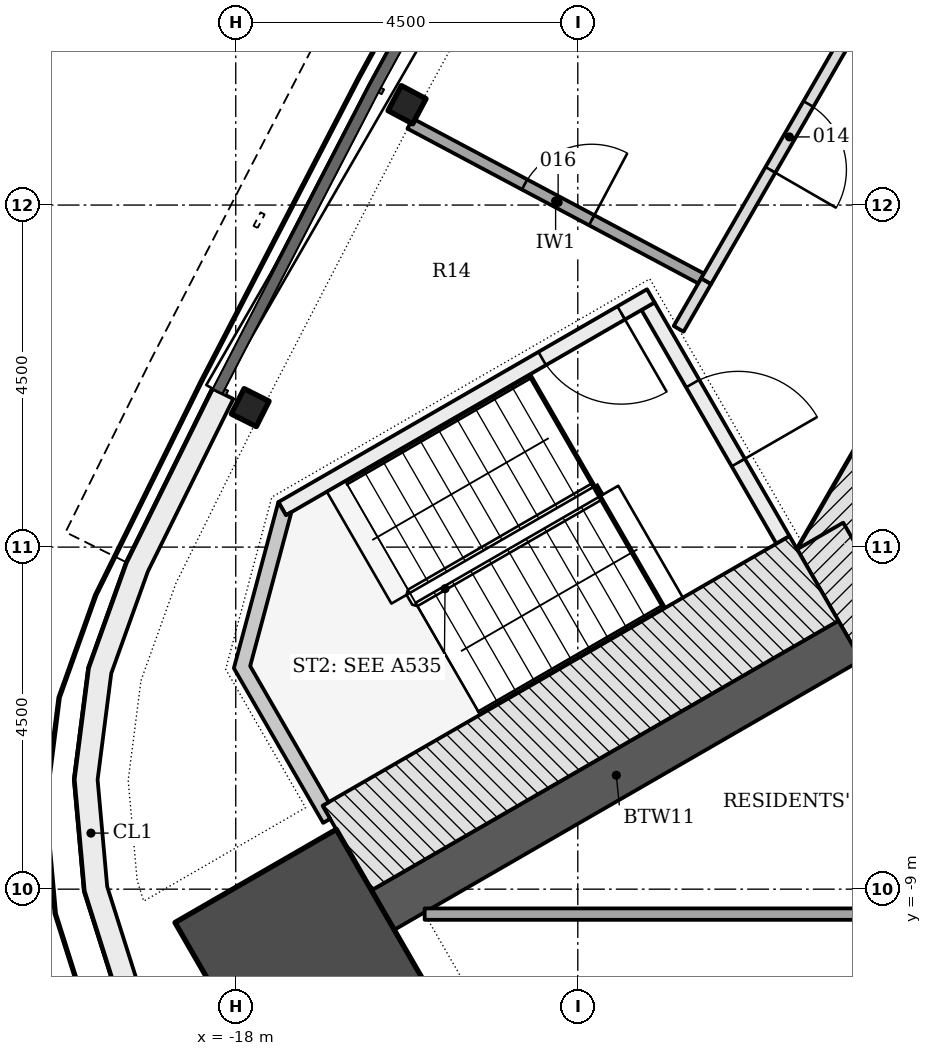
"""IFC4 building model, lengths in metres.
Left out: names, types, materials, properties, quantities, classifications, styles, units other than length and angle.
Written with IfcOpenShell. Run it as: python <this file> out.ifc"""

import sys

from ifc_helpers import new_model, si_unit, direction, frame, frame_2d, origin, origin_2d, place, context, subcontext, project, spatial, polyline, rectangle, i_section, outline, extrude, element, fill, save


model = new_model("IFC4")
c1 = context("Model", 3, precision=1e-05, world=origin(), true_north=direction((0.0, 1.0)))
c2 = subcontext(c1, "Body", "Model", "MODEL_VIEW")
j1 = project(units=[si_unit("LENGTHUNIT", "METRE"), si_unit("PLANEANGLEUNIT", "RADIAN")], contexts=[c1])
p1 = place(None, origin())
s1 = spatial("IfcSite", under=j1, at=p1, CompositionType="ELEMENT")
p2 = place(p1, origin())
s2 = spatial("IfcBuilding", under=s1, at=p2, CompositionType="ELEMENT")
p3 = place(p2, frame((0.0, 0.0, 240.0)))
s3 = spatial("IfcBuildingStorey", under=s2, at=p3, CompositionType="ELEMENT", Elevation=240.0)
p4 = place(p3, frame((-1.083, 11.281, -0.2), z_axis=(0.0, 0.0, 1.0), x_axis=(-0.500001446645, -0.866024568562, 0.0)))
e1 = element("IfcWall", 1, at=p4, inside=s3, PredefinedType="SHEAR", context=c2, shape_type="SweptSolid", body=[
    extrude(rectangle(XDim=18.458, YDim=0.7, at=frame_2d((9.229, 0.0))), origin(), (0.0, 0.0, 1.0), 3.6),
])
p5 = place(p4, frame((8.979, 0.0, 0.2)))
e2 = element("IfcOpeningElement", 2, at=p5, cuts=e1, PredefinedType="OPENING", context=c2, shape_type="SweptSolid", body=[
    extrude(rectangle(XDim=1.2, YDim=2.1, at=frame_2d((0.6, 1.05))), frame((0.0, 0.36, 0.0), z_axis=(0.0, -1.0, 0.0), x_axis=(1.0, 0.0, 0.0)), (0.0, 0.0, 1.0), 0.72),
])
p6 = place(p4, frame((11.029, 0.0, 0.2)))
e3 = element("IfcOpeningElement", 3, at=p6, cuts=e1, PredefinedType="OPENING", context=c2, shape_type="SweptSolid", body=[
    extrude(rectangle(XDim=1.2, YDim=2.1, at=frame_2d((0.6, 1.05))), frame((0.0, 0.36, 0.0), z_axis=(0.0, -1.0, 0.0), x_axis=(1.0, 0.0, 0.0)), (0.0, 0.0, 1.0), 0.72),
])
p7 = place(p3, frame((-10.311, -4.353, -0.2), z_axis=(0.0, 0.0, 1.0), x_axis=(0.500042739161, -0.866000726912, 0.0)))
e4 = element("IfcWall", 4, at=p7, inside=s3, PredefinedType="SHEAR", context=c2, shape_type="SweptSolid", body=[
    extrude(rectangle(XDim=2.771, YDim=0.7, at=frame_2d((1.386, 0.0))), origin(), (0.0, 0.0, 1.0), 3.6),
])
p8 = place(p3, frame((-9.922, -5.728, -0.2), z_axis=(0.0, 0.0, 1.0), x_axis=(-0.866029688112, -0.499992579254, 0.0)))
e5 = element("IfcWall", 5, at=p8, inside=s3, PredefinedType="SHEAR", context=c2, shape_type="SweptSolid", body=[
    extrude(rectangle(XDim=7.093, YDim=0.6, at=frame_2d((3.547, 0.0))), origin(), (0.0, 0.0, 1.0), 3.6),
])
p9 = place(p3, frame((-17.126, -9.887, -0.2), z_axis=(0.0, 0.0, 1.0), x_axis=(-0.866025403784, -0.5, 0.0)))
e6 = element("IfcColumn", 6, at=p9, inside=s3, PredefinedType="COLUMN", context=c2, shape_type="SweptSolid", body=[
    extrude(rectangle(XDim=2.45, YDim=2.45, at=origin_2d()), origin(), (0.0, 0.0, 1.0), 3.6),
])
for number, where, z_axis, x_axis in (
    (7, (-15.747, 1.32, -0.2), (0.0, 0.0, 1.0), (-0.47, -0.883, 0.0)),
    (8, (-17.81, -2.665, -0.2), (0.0, 0.0, 1.0), (-0.45, -0.893, 0.0)),
):
    element("IfcColumn", number, at=place(p3, frame(where, z_axis=z_axis, x_axis=x_axis)), inside=s3, PredefinedType="COLUMN", context=c2, shape_type="SweptSolid", body=[
        extrude(i_section(OverallWidth=0.373, OverallDepth=0.368, WebThickness=0.015, FlangeThickness=0.024, FilletRadius=0.015, at=origin_2d()), origin(), (0.0, 0.0, 1.0), 3.6),
    ])
p10 = place(p3, origin())
e9 = element("IfcWall", 9, at=p10, inside=s3, PredefinedType="NOTDEFINED", context=c2, shape_type="SweptSolid", body=[
    extrude(outline(polyline([(-18.301, -2.417), (-19.433, -4.702), (-19.931, -6.091), (-20.119, -7.555), (-19.987, -9.024), (-19.542, -10.431), (-18.804, -11.708), (-17.809, -12.798), (-16.602, -13.646), (-15.241, -14.215), (-13.789, -14.478), (-11.244, -14.641), (-11.225, -14.341), (-13.752, -14.18), (-15.155, -13.926), (-16.456, -13.382), (-17.609, -12.571), (-18.561, -11.53), (-19.266, -10.309), (-19.691, -8.965), (-19.817, -7.56), (-19.638, -6.162), (-19.156, -4.82), (-18.032, -2.55), (-18.301, -2.417)])), origin(), (0.0, 0.0, 1.0), 3.3),
])
p11 = place(p3, frame((-12.576, -1.331, -0.2), z_axis=(0.0, 0.0, 1.0), x_axis=(0.499970499736, -0.8660424351, 0.0)))
e10 = element("IfcWall", 10, at=p11, inside=s3, PredefinedType="SHEAR", context=c2, shape_type="SweptSolid", body=[
    extrude(rectangle(XDim=3.55, YDim=0.2, at=frame_2d((1.775, 0.0))), origin(), (0.0, 0.0, 1.0), 3.6),
])
p12 = place(p11, frame((1.175, 0.0, 0.2)))
e11 = element("IfcOpeningElement", 11, at=p12, cuts=e10, PredefinedType="OPENING", context=c2, shape_type="SweptSolid", body=[
    extrude(rectangle(XDim=1.2, YDim=2.1, at=frame_2d((0.6, 1.05))), frame((0.0, 0.11, 0.0), z_axis=(0.0, -1.0, 0.0), x_axis=(1.0, 0.0, 0.0)), (0.0, 0.0, 1.0), 0.22),
])
p13 = place(p3, frame((-12.539, -1.194, -0.2), z_axis=(0.0, 0.0, 1.0), x_axis=(-0.866045472092, -0.499965239061, 0.0)))
e12 = element("IfcWall", 12, at=p13, inside=s3, PredefinedType="SHEAR", context=c2, shape_type="SweptSolid", body=[
    extrude(rectangle(XDim=5.6, YDim=0.2, at=frame_2d((2.8, 0.0))), origin(), (0.0, 0.0, 1.0), 3.6),
])
p14 = place(p13, frame((0.45, 0.0, 0.2)))
e13 = element("IfcOpeningElement", 13, at=p14, cuts=e12, PredefinedType="OPENING", context=c2, shape_type="SweptSolid", body=[
    extrude(rectangle(XDim=1.2, YDim=2.1, at=frame_2d((0.6, 1.05))), frame((0.0, 0.11, 0.0), z_axis=(0.0, -1.0, 0.0), x_axis=(1.0, 0.0, 0.0)), (0.0, 0.0, 1.0), 0.22),
])
p15 = place(p3, frame((-10.393, -4.912, -0.2), z_axis=(0.0, 0.0, 1.0), x_axis=(-0.866023389271, -0.500003489223, 0.0)))
e14 = element("IfcWall", 14, at=p15, inside=s3, PredefinedType="SHEAR", context=c2, shape_type="SweptSolid", body=[
    extrude(rectangle(XDim=7.094, YDim=1.286, at=frame_2d((3.547, 0.0))), origin(), (0.0, 0.0, 1.0), 3.6),
])
p16 = place(p3, frame((0.0, 0.0, -0.2)))
e15 = element("IfcWall", 15, at=p16, inside=s3, PredefinedType="SHEAR", context=c2, shape_type="SweptSolid", body=[
    extrude(outline(polyline([(-17.439, -3.907), (-18.025, -6.093), (-16.85, -8.128), (-16.758, -8.075), (-16.858, -7.902), (-16.858, -7.902), (-16.858, -7.902), (-16.858, -7.902), (-16.858, -7.902), (-16.858, -7.902), (-16.858, -7.902), (-16.858, -7.902), (-16.858, -7.902), (-16.858, -7.902), (-16.858, -7.902), (-16.858, -7.902), (-16.858, -7.902), (-16.858, -7.902), (-16.858, -7.902), (-16.858, -7.902), (-16.858, -7.902), (-16.777, -7.855), (-17.81, -6.065), (-17.267, -4.039), (-17.339, -4.081), (-17.339, -4.081), (-17.339, -4.081), (-17.339, -4.081), (-17.339, -4.081), (-17.339, -4.081), (-17.339, -4.081), (-17.339, -4.081), (-17.339, -4.081), (-17.339, -4.081), (-17.339, -4.081), (-17.339, -4.081), (-17.339, -4.081), (-17.339, -4.081), (-17.339, -4.081), (-17.339, -4.081), (-17.339, -4.081), (-17.439, -3.907)])), origin(), (0.0, 0.0, 1.0), 3.6),
])
p17 = place(p3, frame((-15.514, -9.328, 0.0), z_axis=(0.0, 0.0, 1.0), x_axis=(1.0, 0.0, 0.0)))
e16 = element("IfcWall", 16, at=p17, inside=s3, PredefinedType="PARTITIONING", context=c2, shape_type="SweptSolid", body=[
    extrude(rectangle(XDim=13.529, YDim=0.15, at=frame_2d((6.764, 0.0))), origin(), (0.0, 0.0, 1.0), 2.852),
])
p18 = place(p17, frame((6.096, 0.0, 0.0)))
e17 = element("IfcOpeningElement", 17, at=p18, cuts=e16, PredefinedType="OPENING", context=c2, shape_type="SweptSolid", body=[
    extrude(rectangle(XDim=1.0, YDim=2.1, at=frame_2d((0.5, 1.05))), frame((0.0, 0.085, 0.0), z_axis=(0.0, -1.0, 0.0), x_axis=(1.0, 0.0, 0.0)), (0.0, 0.0, 1.0), 0.17),
])
p19 = place(p3, frame((-11.811, -1.001, 0.0), z_axis=(0.0, 0.0, 1.0), x_axis=(-0.499839240638, -0.866118198353, 0.0)))
e18 = element("IfcWall", 18, at=p19, inside=s3, PredefinedType="PARTITIONING", context=c2, shape_type="SweptSolid", body=[
    extrude(rectangle(XDim=0.724, YDim=0.15, at=frame_2d((0.362, 0.0))), origin(), (0.0, 0.0, 1.0), 3.4),
])
p20 = place(p3, frame((-15.706, 1.072, 0.0), z_axis=(0.0, 0.0, 1.0), x_axis=(0.882697050639, -0.469942461152, 0.0)))
e19 = element("IfcWall", 19, at=p20, inside=s3, PredefinedType="PARTITIONING", context=c2, shape_type="SweptSolid", body=[
    extrude(rectangle(XDim=4.337, YDim=0.15, at=frame_2d((2.169, 0.0))), origin(), (0.0, 0.0, 1.0), 3.4),
])
p21 = place(p20, frame((1.706, 0.0, 0.0)))
e20 = element("IfcOpeningElement", 20, at=p21, cuts=e19, PredefinedType="OPENING", context=c2, shape_type="SweptSolid", body=[
    extrude(rectangle(XDim=1.0, YDim=2.1, at=frame_2d((0.5, 1.05))), frame((0.0, 0.085, 0.0), z_axis=(0.0, -1.0, 0.0), x_axis=(1.0, 0.0, 0.0)), (0.0, 0.0, 1.0), 0.17),
])
p22 = place(p3, frame((-9.62, 2.794, 0.0), z_axis=(0.0, 0.0, 1.0), x_axis=(-0.500021421018, -0.866013036001, 0.0)))
e21 = element("IfcWall", 21, at=p22, inside=s3, PredefinedType="PARTITIONING", context=c2, shape_type="SweptSolid", body=[
    extrude(rectangle(XDim=4.383, YDim=0.15, at=frame_2d((2.191, 0.0))), origin(), (0.0, 0.0, 1.0), 2.852),
])
p23 = place(p22, frame((1.691, 0.0, 0.0)))
e22 = element("IfcOpeningElement", 22, at=p23, cuts=e21, PredefinedType="OPENING", context=c2, shape_type="SweptSolid", body=[
    extrude(rectangle(XDim=1.0, YDim=2.1, at=frame_2d((0.5, 1.05))), frame((0.0, 0.085, 0.0), z_axis=(0.0, -1.0, 0.0), x_axis=(1.0, 0.0, 0.0)), (0.0, 0.0, 1.0), 0.17),
])
p24 = place(p12, origin())
e23 = element("IfcDoor", 23, at=p24, inside=s3, OperationType="SINGLE_SWING_RIGHT", PredefinedType="DOOR", context=c2, shape_type="SweptSolid", body=[
    extrude(rectangle(XDim=1.2, YDim=2.1, at=frame_2d((0.6, 1.05))), frame((0.0, 0.025, 0.0), z_axis=(0.0, -1.0, 0.0), x_axis=(1.0, 0.0, 0.0)), (0.0, 0.0, 1.0), 0.05),
])
fill(e11, e23)
p25 = place(p14, origin())
e24 = element("IfcDoor", 24, at=p25, inside=s3, OperationType="SINGLE_SWING_LEFT", PredefinedType="DOOR", context=c2, shape_type="SweptSolid", body=[
    extrude(rectangle(XDim=1.2, YDim=2.1, at=frame_2d((0.6, 1.05))), frame((0.0, 0.025, 0.0), z_axis=(0.0, -1.0, 0.0), x_axis=(1.0, 0.0, 0.0)), (0.0, 0.0, 1.0), 0.05),
])
fill(e13, e24)
p26 = place(p23, origin())
e25 = element("IfcDoor", 25, at=p26, inside=s3, OperationType="SINGLE_SWING_RIGHT", PredefinedType="DOOR", context=c2, shape_type="SweptSolid", body=[
    extrude(rectangle(XDim=1.0, YDim=2.1, at=frame_2d((0.5, 1.05))), frame((0.0, 0.025, 0.0), z_axis=(0.0, -1.0, 0.0), x_axis=(1.0, 0.0, 0.0)), (0.0, 0.0, 1.0), 0.05),
])
fill(e22, e25)
p27 = place(p21, origin())
e26 = element("IfcDoor", 26, at=p27, inside=s3, OperationType="SINGLE_SWING_RIGHT", PredefinedType="DOOR", context=c2, shape_type="SweptSolid", body=[
    extrude(rectangle(XDim=1.0, YDim=2.1, at=frame_2d((0.5, 1.05))), frame((0.0, 0.025, 0.0), z_axis=(0.0, -1.0, 0.0), x_axis=(1.0, 0.0, 0.0)), (0.0, 0.0, 1.0), 0.05),
])
fill(e20, e26)
save(model, sys.argv[1])
